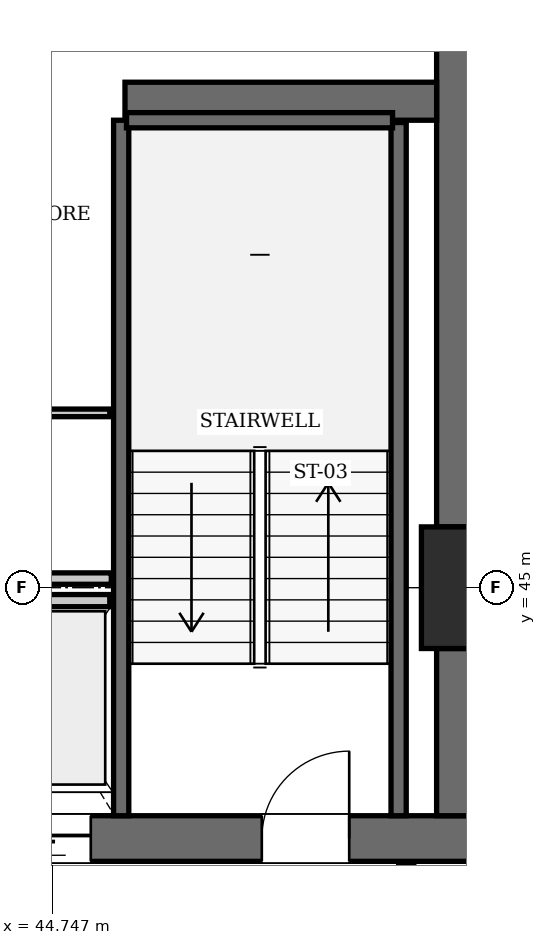
"""IFC4 building model, lengths in metres.
Left out: names, types, materials, properties, quantities, classifications, styles, units other than length and angle.
Written with IfcOpenShell. Run it as: python <this file> out.ifc"""

import sys

from ifc_helpers import new_model, si_unit, direction, frame, frame_2d, origin, origin_2d, place, context, subcontext, project, spatial, rectangle, extrude, element, fill, save


model = new_model("IFC4")
c1 = context("Model", 3, precision=1e-05, world=origin(), true_north=direction((0.0, 1.0)))
c2 = subcontext(c1, "Body", "Model", "MODEL_VIEW")
j1 = project(units=[si_unit("LENGTHUNIT", "METRE"), si_unit("PLANEANGLEUNIT", "RADIAN")], contexts=[c1])
p1 = place(None, origin())
s1 = spatial("IfcSite", under=j1, at=p1, CompositionType="ELEMENT")
p2 = place(p1, origin())
s2 = spatial("IfcBuilding", under=s1, at=p2, CompositionType="ELEMENT")
p3 = place(p2, frame((0.0, 0.0, 281.75)))
s3 = spatial("IfcBuildingStorey", under=s2, at=p3, CompositionType="ELEMENT", Elevation=281.75)
p4 = place(p3, frame((50.4, 45.0, 0.0), z_axis=(0.0, 0.0, 1.0), x_axis=(1.0, 0.0, 0.0)))
e1 = element("IfcColumn", 1, at=p4, inside=s3, PredefinedType="COLUMN", context=c2, shape_type="SweptSolid", body=[
    extrude(rectangle(XDim=1.6, YDim=1.6, at=origin_2d()), origin(), (0.0, 0.0, 1.0), 3.85),
])
p5 = place(p3, frame((43.6, 41.7, 0.0), z_axis=(0.0, 0.0, 1.0), x_axis=(1.0, 0.0, 0.0)))
e2 = element("IfcWall", 2, at=p5, inside=s3, PredefinedType="SHEAR", context=c2, shape_type="SweptSolid", body=[
    extrude(rectangle(XDim=6.8, YDim=0.6, at=frame_2d((3.4, 0.0))), origin(), (0.0, 0.0, 1.0), 3.85),
])
p6 = place(p5, frame((3.9, 0.0, 0.0)))
e3 = element("IfcOpeningElement", 3, at=p6, cuts=e2, PredefinedType="OPENING", context=c2, shape_type="SweptSolid", body=[
    extrude(rectangle(XDim=1.15, YDim=2.15, at=frame_2d((0.575, 1.075))), frame((0.0, 0.31, 0.0), z_axis=(0.0, -1.0, 0.0), x_axis=(1.0, 0.0, 0.0)), (0.0, 0.0, 1.0), 0.62),
])
p7 = place(p5, frame((0.55, 0.0, 0.0)))
e4 = element("IfcOpeningElement", 4, at=p7, cuts=e2, PredefinedType="OPENING", context=c2, shape_type="SweptSolid", body=[
    extrude(rectangle(XDim=1.1, YDim=2.2, at=frame_2d((0.55, 1.1))), frame((0.0, 0.31, 0.0), z_axis=(0.0, -1.0, 0.0), x_axis=(1.0, 0.0, 0.0)), (0.0, 0.0, 1.0), 0.62),
])
p8 = place(p3, frame((50.1, 42.0, 0.0), z_axis=(0.0, 0.0, 1.0), x_axis=(0.0, 1.0, 0.0)))
e5 = element("IfcWall", 5, at=p8, inside=s3, PredefinedType="SHEAR", context=c2, shape_type="SweptSolid", body=[
    extrude(rectangle(XDim=2.2, YDim=0.6, at=frame_2d((1.1, 0.0))), origin(), (0.0, 0.0, 1.0), 3.85),
])
p9 = place(p3, frame((50.1, 45.8, 0.0), z_axis=(0.0, 0.0, 1.0), x_axis=(0.0, 1.0, 0.0)))
e6 = element("IfcWall", 6, at=p9, inside=s3, PredefinedType="SHEAR", context=c2, shape_type="SweptSolid", body=[
    extrude(rectangle(XDim=7.6, YDim=0.6, at=frame_2d((3.8, 0.0))), origin(), (0.0, 0.0, 1.0), 3.85),
])
p10 = place(p3, frame((45.7, 51.4, 0.0), z_axis=(0.0, 0.0, 1.0), x_axis=(1.0, 0.0, 0.0)))
e7 = element("IfcWall", 7, at=p10, inside=s3, PredefinedType="SHEAR", context=c2, shape_type="SweptSolid", body=[
    extrude(rectangle(XDim=4.1, YDim=0.5, at=frame_2d((2.05, 0.0))), origin(), (0.0, 0.0, 1.0), 3.85),
])
p11 = place(p3, frame((45.65, 42.0, 0.0), z_axis=(0.0, 0.0, 1.0), x_axis=(0.0, 1.0, 0.0)))
e8 = element("IfcWall", 8, at=p11, inside=s3, PredefinedType="SOLIDWALL", context=c2, shape_type="SweptSolid", body=[
    extrude(rectangle(XDim=9.15, YDim=0.2, at=frame_2d((4.575, 0.0))), origin(), (0.0, 0.0, 1.0), 3.61),
])
p12 = place(p3, frame((49.3, 42.0, 0.0), z_axis=(0.0, 0.0, 1.0), x_axis=(0.0, 1.0, 0.0)))
e9 = element("IfcWall", 9, at=p12, inside=s3, PredefinedType="SOLIDWALL", context=c2, shape_type="SweptSolid", body=[
    extrude(rectangle(XDim=9.12, YDim=0.2, at=frame_2d((4.56, 0.0))), origin(), (0.0, 0.0, 1.0), 3.61),
])
p13 = place(p3, frame((45.72, 51.15, 0.0), z_axis=(0.0, 0.0, 1.0), x_axis=(1.0, 0.0, 0.0)))
e10 = element("IfcWall", 10, at=p13, inside=s3, PredefinedType="SOLIDWALL", context=c2, shape_type="SweptSolid", body=[
    extrude(rectangle(XDim=3.5, YDim=0.2, at=frame_2d((1.75, 0.0))), origin(), (0.0, 0.0, 1.0), 3.61),
])
p14 = place(p3, frame((43.9, 44.83, 0.0), z_axis=(0.0, 0.0, 1.0), x_axis=(1.0, 0.0, 0.0)))
e11 = element("IfcWall", 11, at=p14, inside=s3, PredefinedType="SOLIDWALL", context=c2, shape_type="SweptSolid", body=[
    extrude(rectangle(XDim=1.6, YDim=0.16, at=frame_2d((0.8, 0.0))), origin(), (0.0, 0.0, 1.0), 3.61),
])
p15 = place(p3, frame((49.4, 38.31, 0.0), z_axis=(0.0, 0.0, 1.0), x_axis=(0.0, 1.0, 0.0)))
e12 = element("IfcWall", 12, at=p15, inside=s3, PredefinedType="PARTITIONING", context=c2, shape_type="SweptSolid", body=[
    extrude(rectangle(XDim=3.07, YDim=0.2, at=frame_2d((1.535, 0.0))), origin(), (0.0, 0.0, 1.0), 3.61),
])
p16 = place(p3, frame((42.4, 47.3, 0.0), z_axis=(0.0, 0.0, 1.0), x_axis=(1.0, 0.0, 0.0)))
e13 = element("IfcWall", 13, at=p16, inside=s3, PredefinedType="PARTITIONING", context=c2, shape_type="SweptSolid", body=[
    extrude(rectangle(XDim=3.1, YDim=0.1, at=frame_2d((1.55, 0.0))), origin(), (0.0, 0.0, 1.0), 3.61),
])
p17 = place(p3, frame((42.38, 45.12, 0.0), z_axis=(0.0, 0.0, 1.0), x_axis=(1.0, 0.0, 0.0)))
e14 = element("IfcWall", 14, at=p17, inside=s3, PredefinedType="PARTITIONING", context=c2, shape_type="SweptSolid", body=[
    extrude(rectangle(XDim=3.14, YDim=0.15, at=frame_2d((1.57, 0.0))), origin(), (0.0, 0.0, 1.0), 3.61),
])
p18 = place(p6, origin())
e15 = element("IfcDoor", 15, at=p18, inside=s3, OperationType="SINGLE_SWING_RIGHT", PredefinedType="DOOR", context=c2, shape_type="SweptSolid", body=[
    extrude(rectangle(XDim=1.15, YDim=2.15, at=frame_2d((0.575, 1.075))), frame((0.0, 0.025, 0.0), z_axis=(0.0, -1.0, 0.0), x_axis=(1.0, 0.0, 0.0)), (0.0, 0.0, 1.0), 0.05),
])
fill(e3, e15)
p19 = place(p7, frame((1.1, 0.0, 0.0), z_axis=(0.0, 0.0, 1.0), x_axis=(-1.0, 0.0, 0.0)))
e16 = element("IfcDoor", 16, at=p19, inside=s3, OperationType="SLIDING_TO_LEFT", PredefinedType="DOOR", context=c2, shape_type="SweptSolid", body=[
    extrude(rectangle(XDim=1.1, YDim=2.2, at=frame_2d((0.55, 1.1))), frame((0.0, 0.025, 0.0), z_axis=(0.0, -1.0, 0.0), x_axis=(1.0, 0.0, 0.0)), (0.0, 0.0, 1.0), 0.05),
])
fill(e4, e16)
save(model, sys.argv[1])
